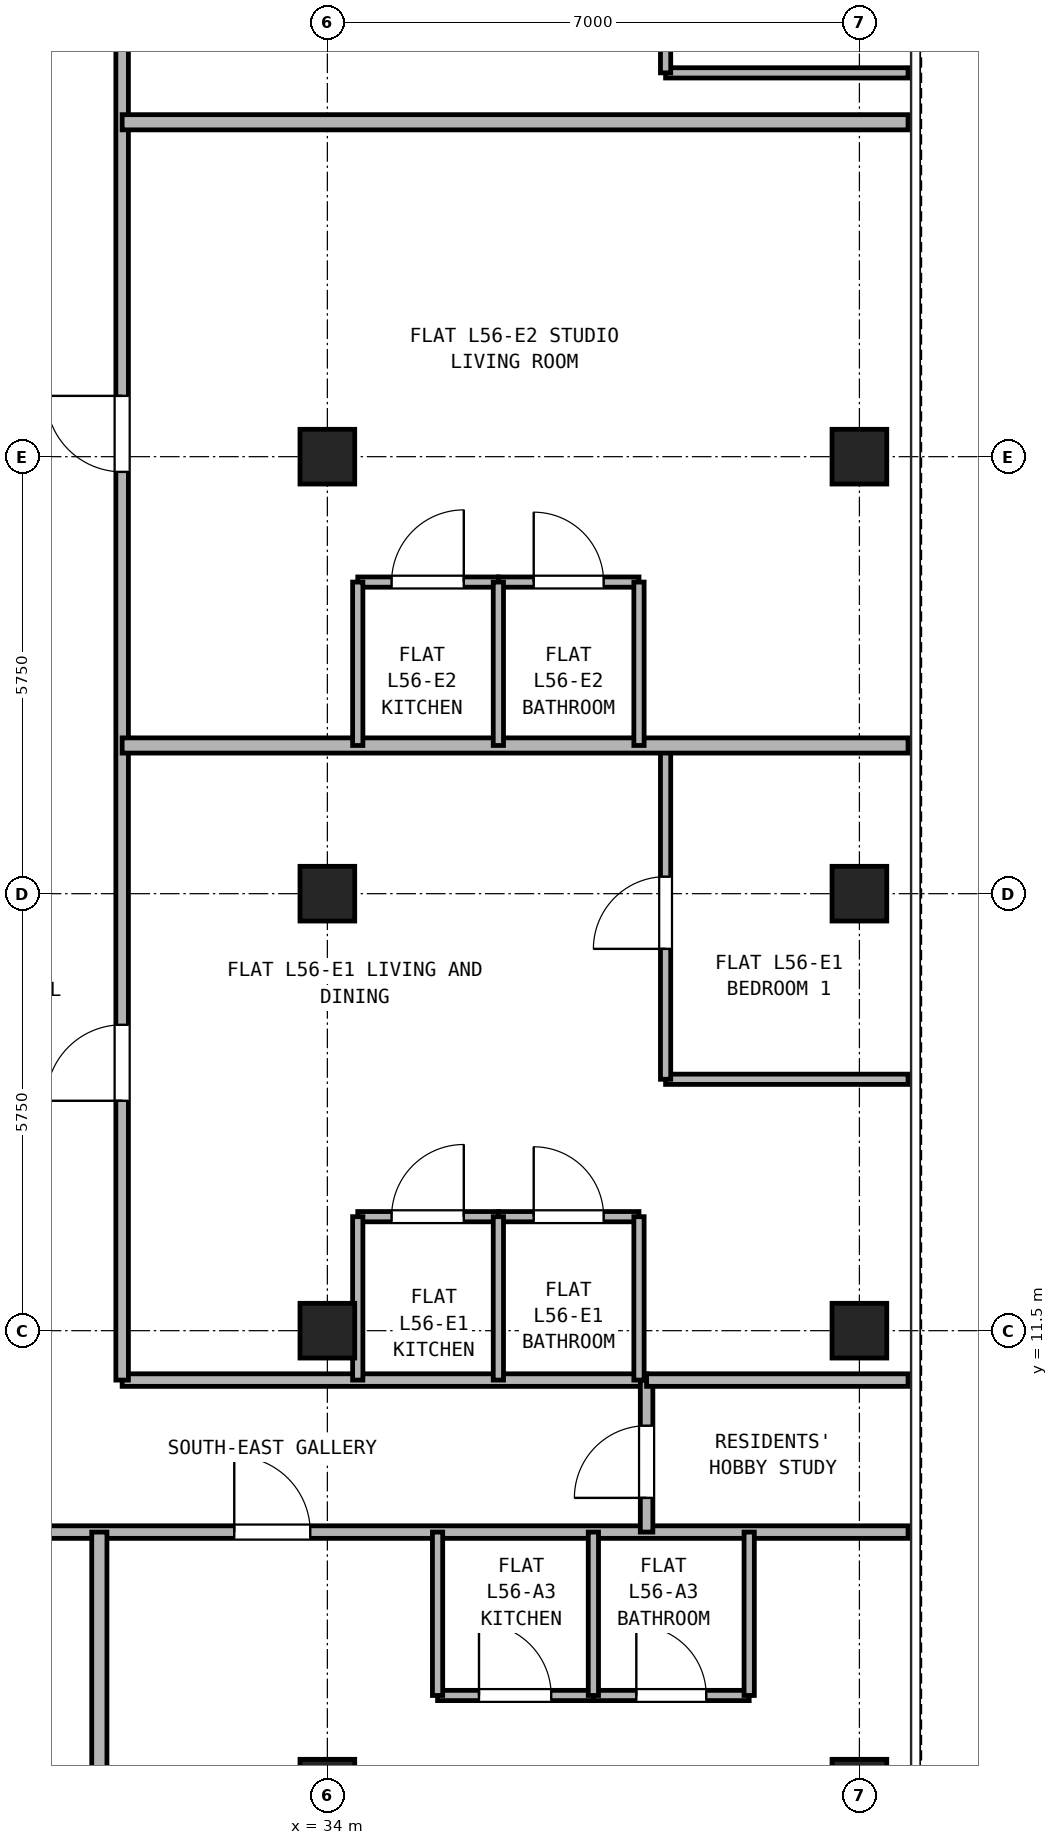
"""IFC4 building model, lengths in metres.
Left out: names, types, materials, properties, quantities, classifications, styles, units other than length and angle.
Written with IfcOpenShell. Run it as: python <this file> out.ifc"""

import sys

from ifc_helpers import new_model, si_unit, direction, frame, frame_2d, origin, origin_2d, place, context, subcontext, project, spatial, rectangle, hollow_rectangle, extrude, source, transform, mapped, element, fill, save


model = new_model("IFC4")
c1 = context("Model", 3, precision=1e-05, world=origin(), true_north=direction((0.0, 1.0)))
c2 = subcontext(c1, "Body", "Model", "MODEL_VIEW")
j1 = project(units=[si_unit("LENGTHUNIT", "METRE"), si_unit("PLANEANGLEUNIT", "RADIAN")], contexts=[c1])
p1 = place(None, origin())
s1 = spatial("IfcSite", under=j1, at=p1, CompositionType="ELEMENT")
p2 = place(p1, origin())
s2 = spatial("IfcBuilding", under=s1, at=p2, CompositionType="ELEMENT")
p3 = place(p2, frame((0.0, 0.0, 199.6)))
s3 = spatial("IfcBuildingStorey", under=s2, at=p3, CompositionType="ELEMENT", Elevation=199.6)
m1 = source(origin(), c2, "Body", "SweptSolid", [
    extrude(hollow_rectangle(XDim=0.72, YDim=0.72, WallThickness=0.04, at=origin_2d()), origin(), (0.0, 0.0, 1.0), 2.95),
])
for number, where, z_axis, x_axis in (
    (1, (41.0, 5.5, 0.0), (0.0, 0.0, 1.0), (1.0, 0.0, 0.0)),
    (2, (41.0, 11.5, 0.0), (0.0, 0.0, 1.0), (1.0, 0.0, 0.0)),
    (3, (41.0, 17.25, 0.0), (0.0, 0.0, 1.0), (1.0, 0.0, 0.0)),
    (4, (41.0, 23.0, 0.0), (0.0, 0.0, 1.0), (1.0, 0.0, 0.0)),
    (5, (34.0, 5.5, 0.0), (0.0, 0.0, 1.0), (1.0, 0.0, 0.0)),
    (6, (34.0, 11.5, 0.0), (0.0, 0.0, 1.0), (1.0, 0.0, 0.0)),
    (7, (34.0, 17.25, 0.0), (0.0, 0.0, 1.0), (1.0, 0.0, 0.0)),
    (8, (34.0, 23.0, 0.0), (0.0, 0.0, 1.0), (1.0, 0.0, 0.0)),
):
    element("IfcColumn", number, at=place(p3, frame(where, z_axis=z_axis, x_axis=x_axis)), inside=s3, PredefinedType="COLUMN", context=c2, shape_type="MappedRepresentation", body=[
        mapped(m1, transform((0.0, 0.0, 0.0), x_axis=(1.0, 0.0, 0.0), y_axis=(0.0, 1.0, 0.0), z_axis=(0.0, 0.0, 1.0), scale=1.0)),
    ])
p4 = place(p3, frame((0.16, 8.85, 0.0), z_axis=(0.0, 0.0, 1.0), x_axis=(1.0, 0.0, 0.0)))
e9 = element("IfcWall", 9, at=p4, inside=s3, PredefinedType="PARTITIONING", context=c2, shape_type="SweptSolid", body=[
    extrude(rectangle(XDim=41.48, YDim=0.165, at=frame_2d((20.74, 0.0))), origin(), (0.0, 0.0, 1.0), 2.95),
])
p5 = place(p4, frame((14.815, 0.0, 0.0)))
e10 = element("IfcOpeningElement", 10, at=p5, cuts=e9, PredefinedType="OPENING", context=c2, shape_type="SweptSolid", body=[
    extrude(rectangle(XDim=1.0, YDim=2.15, at=frame_2d((0.5, 1.075))), frame((0.0, 0.093, 0.0), z_axis=(0.0, -1.0, 0.0), x_axis=(1.0, 0.0, 0.0)), (0.0, 0.0, 1.0), 0.185),
])
p6 = place(p4, frame((28.315, 0.0, 0.0)))
e11 = element("IfcOpeningElement", 11, at=p6, cuts=e9, PredefinedType="OPENING", context=c2, shape_type="SweptSolid", body=[
    extrude(rectangle(XDim=1.0, YDim=2.15, at=frame_2d((0.5, 1.075))), frame((0.0, 0.093, 0.0), z_axis=(0.0, -1.0, 0.0), x_axis=(1.0, 0.0, 0.0)), (0.0, 0.0, 1.0), 0.185),
])
p7 = place(p4, frame((32.615, 0.0, 0.0)))
e12 = element("IfcOpeningElement", 12, at=p7, cuts=e9, PredefinedType="OPENING", context=c2, shape_type="SweptSolid", body=[
    extrude(rectangle(XDim=1.0, YDim=2.15, at=frame_2d((0.5, 1.075))), frame((0.0, 0.093, 0.0), z_axis=(0.0, -1.0, 0.0), x_axis=(1.0, 0.0, 0.0)), (0.0, 0.0, 1.0), 0.185),
])
p8 = place(p3, frame((31.3, 10.85, 0.0), z_axis=(0.0, 0.0, 1.0), x_axis=(1.0, 0.0, 0.0)))
e13 = element("IfcWall", 13, at=p8, inside=s3, PredefinedType="PARTITIONING", context=c2, shape_type="SweptSolid", body=[
    extrude(rectangle(XDim=6.9, YDim=0.165, at=frame_2d((3.45, 0.0))), origin(), (0.0, 0.0, 1.0), 2.95),
])
p9 = place(p3, frame((38.2, 8.85, 0.0), z_axis=(0.0, 0.0, 1.0), x_axis=(0.0, 1.0, 0.0)))
e14 = element("IfcWall", 14, at=p9, inside=s3, PredefinedType="PARTITIONING", context=c2, shape_type="SweptSolid", body=[
    extrude(rectangle(XDim=2.0, YDim=0.165, at=frame_2d((1.0, 0.0))), origin(), (0.0, 0.0, 1.0), 2.95),
])
p10 = place(p9, frame((0.45, 0.0, 0.0)))
e15 = element("IfcOpeningElement", 15, at=p10, cuts=e14, PredefinedType="OPENING", context=c2, shape_type="SweptSolid", body=[
    extrude(rectangle(XDim=0.95, YDim=2.15, at=frame_2d((0.475, 1.075))), frame((0.0, 0.093, 0.0), z_axis=(0.0, -1.0, 0.0), x_axis=(1.0, 0.0, 0.0)), (0.0, 0.0, 1.0), 0.185),
])
p11 = place(p3, frame((31.3, 10.85, 0.0), z_axis=(0.0, 0.0, 1.0), x_axis=(0.0, 1.0, 0.0)))
e16 = element("IfcWall", 16, at=p11, inside=s3, PredefinedType="PARTITIONING", context=c2, shape_type="SweptSolid", body=[
    extrude(rectangle(XDim=24.29, YDim=0.165, at=frame_2d((12.145, 0.0))), origin(), (0.0, 0.0, 1.0), 2.95),
])
p12 = place(p11, frame((3.675, 0.0, 0.0)))
e17 = element("IfcOpeningElement", 17, at=p12, cuts=e16, PredefinedType="OPENING", context=c2, shape_type="SweptSolid", body=[
    extrude(rectangle(XDim=1.0, YDim=2.15, at=frame_2d((0.5, 1.075))), frame((0.0, 0.093, 0.0), z_axis=(0.0, -1.0, 0.0), x_axis=(1.0, 0.0, 0.0)), (0.0, 0.0, 1.0), 0.185),
])
p13 = place(p11, frame((11.95, 0.0, 0.0)))
e18 = element("IfcOpeningElement", 18, at=p13, cuts=e16, PredefinedType="OPENING", context=c2, shape_type="SweptSolid", body=[
    extrude(rectangle(XDim=1.0, YDim=2.15, at=frame_2d((0.5, 1.075))), frame((0.0, 0.093, 0.0), z_axis=(0.0, -1.0, 0.0), x_axis=(1.0, 0.0, 0.0)), (0.0, 0.0, 1.0), 0.185),
])
p14 = place(p11, frame((17.75, 0.0, 0.0)))
e19 = element("IfcOpeningElement", 19, at=p14, cuts=e16, PredefinedType="OPENING", context=c2, shape_type="SweptSolid", body=[
    extrude(rectangle(XDim=1.0, YDim=2.15, at=frame_2d((0.5, 1.075))), frame((0.0, 0.093, 0.0), z_axis=(0.0, -1.0, 0.0), x_axis=(1.0, 0.0, 0.0)), (0.0, 0.0, 1.0), 0.185),
])
p15 = place(p3, frame((31.0, 0.16, 0.0), z_axis=(0.0, 0.0, 1.0), x_axis=(0.0, 1.0, 0.0)))
e20 = element("IfcWall", 20, at=p15, inside=s3, PredefinedType="PARTITIONING", context=c2, shape_type="SweptSolid", body=[
    extrude(rectangle(XDim=8.69, YDim=0.2, at=frame_2d((4.345, 0.0))), origin(), (0.0, 0.0, 1.0), 2.95),
])
p16 = place(p3, frame((35.45, 6.7, 0.0), z_axis=(0.0, 0.0, 1.0), x_axis=(1.0, 0.0, 0.0)))
e21 = element("IfcWall", 21, at=p16, inside=s3, PredefinedType="PARTITIONING", context=c2, shape_type="SweptSolid", body=[
    extrude(rectangle(XDim=2.05, YDim=0.135, at=frame_2d((1.025, 0.0))), origin(), (0.0, 0.0, 1.0), 2.95),
])
p17 = place(p16, frame((0.545, 0.0, 0.0)))
e22 = element("IfcOpeningElement", 22, at=p17, cuts=e21, PredefinedType="OPENING", context=c2, shape_type="SweptSolid", body=[
    extrude(rectangle(XDim=0.95, YDim=2.15, at=frame_2d((0.475, 1.075))), frame((0.0, 0.077, 0.0), z_axis=(0.0, -1.0, 0.0), x_axis=(1.0, 0.0, 0.0)), (0.0, 0.0, 1.0), 0.155),
])
p18 = place(p3, frame((37.5, 6.7, 0.0), z_axis=(0.0, 0.0, 1.0), x_axis=(1.0, 0.0, 0.0)))
e23 = element("IfcWall", 23, at=p18, inside=s3, PredefinedType="PARTITIONING", context=c2, shape_type="SweptSolid", body=[
    extrude(rectangle(XDim=2.05, YDim=0.135, at=frame_2d((1.025, 0.0))), origin(), (0.0, 0.0, 1.0), 2.95),
])
p19 = place(p18, frame((0.565, 0.0, 0.0)))
e24 = element("IfcOpeningElement", 24, at=p19, cuts=e23, PredefinedType="OPENING", context=c2, shape_type="SweptSolid", body=[
    extrude(rectangle(XDim=0.92, YDim=2.1, at=frame_2d((0.46, 1.05))), frame((0.0, 0.077, 0.0), z_axis=(0.0, -1.0, 0.0), x_axis=(1.0, 0.0, 0.0)), (0.0, 0.0, 1.0), 0.155),
])
for number, where, z_axis, x_axis in (
    (25, (35.45, 6.7, 0.0), (0.0, 0.0, 1.0), (0.0, 1.0, 0.0)),
    (26, (37.5, 6.7, 0.0), (0.0, 0.0, 1.0), (0.0, 1.0, 0.0)),
    (27, (39.55, 6.7, 0.0), (0.0, 0.0, 1.0), (0.0, 1.0, 0.0)),
):
    element("IfcWall", number, at=place(p3, frame(where, z_axis=z_axis, x_axis=x_axis)), inside=s3, PredefinedType="PARTITIONING", context=c2, shape_type="SweptSolid", body=[
        extrude(rectangle(XDim=2.15, YDim=0.135, at=frame_2d((1.075, 0.0))), origin(), (0.0, 0.0, 1.0), 2.95),
    ])
p20 = place(p3, frame((38.2, 10.85, 0.0), z_axis=(0.0, 0.0, 1.0), x_axis=(1.0, 0.0, 0.0)))
e28 = element("IfcWall", 28, at=p20, inside=s3, PredefinedType="PARTITIONING", context=c2, shape_type="SweptSolid", body=[
    extrude(rectangle(XDim=3.44, YDim=0.165, at=frame_2d((1.72, 0.0))), origin(), (0.0, 0.0, 1.0), 2.95),
])
p21 = place(p3, frame((34.4, 13.0, 0.0), z_axis=(0.0, 0.0, 1.0), x_axis=(1.0, 0.0, 0.0)))
e29 = element("IfcWall", 29, at=p21, inside=s3, PredefinedType="PARTITIONING", context=c2, shape_type="SweptSolid", body=[
    extrude(rectangle(XDim=1.85, YDim=0.135, at=frame_2d((0.925, 0.0))), origin(), (0.0, 0.0, 1.0), 2.95),
])
p22 = place(p21, frame((0.445, 0.0, 0.0)))
e30 = element("IfcOpeningElement", 30, at=p22, cuts=e29, PredefinedType="OPENING", context=c2, shape_type="SweptSolid", body=[
    extrude(rectangle(XDim=0.95, YDim=2.15, at=frame_2d((0.475, 1.075))), frame((0.0, 0.077, 0.0), z_axis=(0.0, -1.0, 0.0), x_axis=(1.0, 0.0, 0.0)), (0.0, 0.0, 1.0), 0.155),
])
p23 = place(p3, frame((36.25, 13.0, 0.0), z_axis=(0.0, 0.0, 1.0), x_axis=(1.0, 0.0, 0.0)))
e31 = element("IfcWall", 31, at=p23, inside=s3, PredefinedType="PARTITIONING", context=c2, shape_type="SweptSolid", body=[
    extrude(rectangle(XDim=1.85, YDim=0.135, at=frame_2d((0.925, 0.0))), origin(), (0.0, 0.0, 1.0), 2.95),
])
p24 = place(p23, frame((0.465, 0.0, 0.0)))
e32 = element("IfcOpeningElement", 32, at=p24, cuts=e31, PredefinedType="OPENING", context=c2, shape_type="SweptSolid", body=[
    extrude(rectangle(XDim=0.92, YDim=2.1, at=frame_2d((0.46, 1.05))), frame((0.0, 0.077, 0.0), z_axis=(0.0, -1.0, 0.0), x_axis=(1.0, 0.0, 0.0)), (0.0, 0.0, 1.0), 0.155),
])
for number, where, z_axis, x_axis in (
    (33, (34.4, 10.85, 0.0), (0.0, 0.0, 1.0), (0.0, 1.0, 0.0)),
    (34, (36.25, 10.85, 0.0), (0.0, 0.0, 1.0), (0.0, 1.0, 0.0)),
    (35, (38.1, 10.85, 0.0), (0.0, 0.0, 1.0), (0.0, 1.0, 0.0)),
):
    element("IfcWall", number, at=place(p3, frame(where, z_axis=z_axis, x_axis=x_axis)), inside=s3, PredefinedType="PARTITIONING", context=c2, shape_type="SweptSolid", body=[
        extrude(rectangle(XDim=2.15, YDim=0.135, at=frame_2d((1.075, 0.0))), origin(), (0.0, 0.0, 1.0), 2.95),
    ])
p25 = place(p3, frame((38.45, 14.808, 0.0), z_axis=(0.0, 0.0, 1.0), x_axis=(1.0, 0.0, 0.0)))
e36 = element("IfcWall", 36, at=p25, inside=s3, PredefinedType="PARTITIONING", context=c2, shape_type="SweptSolid", body=[
    extrude(rectangle(XDim=3.19, YDim=0.135, at=frame_2d((1.595, 0.0))), origin(), (0.0, 0.0, 1.0), 2.95),
])
p26 = place(p3, frame((38.45, 14.808, 0.0), z_axis=(0.0, 0.0, 1.0), x_axis=(0.0, 1.0, 0.0)))
e37 = element("IfcWall", 37, at=p26, inside=s3, PredefinedType="PARTITIONING", context=c2, shape_type="SweptSolid", body=[
    extrude(rectangle(XDim=4.392, YDim=0.135, at=frame_2d((2.196, 0.0))), origin(), (0.0, 0.0, 1.0), 2.95),
])
p27 = place(p26, frame((1.716, 0.0, 0.0)))
e38 = element("IfcOpeningElement", 38, at=p27, cuts=e37, PredefinedType="OPENING", context=c2, shape_type="SweptSolid", body=[
    extrude(rectangle(XDim=0.95, YDim=2.15, at=frame_2d((0.475, 1.075))), frame((0.0, 0.077, 0.0), z_axis=(0.0, -1.0, 0.0), x_axis=(1.0, 0.0, 0.0)), (0.0, 0.0, 1.0), 0.155),
])
p28 = place(p3, frame((31.3, 19.2, 0.0), z_axis=(0.0, 0.0, 1.0), x_axis=(1.0, 0.0, 0.0)))
e39 = element("IfcWall", 39, at=p28, inside=s3, PredefinedType="PARTITIONING", context=c2, shape_type="SweptSolid", body=[
    extrude(rectangle(XDim=10.34, YDim=0.2, at=frame_2d((5.17, 0.0))), origin(), (0.0, 0.0, 1.0), 2.95),
])
p29 = place(p3, frame((34.4, 21.35, 0.0), z_axis=(0.0, 0.0, 1.0), x_axis=(1.0, 0.0, 0.0)))
e40 = element("IfcWall", 40, at=p29, inside=s3, PredefinedType="PARTITIONING", context=c2, shape_type="SweptSolid", body=[
    extrude(rectangle(XDim=1.85, YDim=0.135, at=frame_2d((0.925, 0.0))), origin(), (0.0, 0.0, 1.0), 2.95),
])
p30 = place(p29, frame((0.445, 0.0, 0.0)))
e41 = element("IfcOpeningElement", 41, at=p30, cuts=e40, PredefinedType="OPENING", context=c2, shape_type="SweptSolid", body=[
    extrude(rectangle(XDim=0.95, YDim=2.15, at=frame_2d((0.475, 1.075))), frame((0.0, 0.077, 0.0), z_axis=(0.0, -1.0, 0.0), x_axis=(1.0, 0.0, 0.0)), (0.0, 0.0, 1.0), 0.155),
])
p31 = place(p3, frame((36.25, 21.35, 0.0), z_axis=(0.0, 0.0, 1.0), x_axis=(1.0, 0.0, 0.0)))
e42 = element("IfcWall", 42, at=p31, inside=s3, PredefinedType="PARTITIONING", context=c2, shape_type="SweptSolid", body=[
    extrude(rectangle(XDim=1.85, YDim=0.135, at=frame_2d((0.925, 0.0))), origin(), (0.0, 0.0, 1.0), 2.95),
])
p32 = place(p31, frame((0.465, 0.0, 0.0)))
e43 = element("IfcOpeningElement", 43, at=p32, cuts=e42, PredefinedType="OPENING", context=c2, shape_type="SweptSolid", body=[
    extrude(rectangle(XDim=0.92, YDim=2.1, at=frame_2d((0.46, 1.05))), frame((0.0, 0.077, 0.0), z_axis=(0.0, -1.0, 0.0), x_axis=(1.0, 0.0, 0.0)), (0.0, 0.0, 1.0), 0.155),
])
for number, where, z_axis, x_axis in (
    (44, (34.4, 19.2, 0.0), (0.0, 0.0, 1.0), (0.0, 1.0, 0.0)),
    (45, (36.25, 19.2, 0.0), (0.0, 0.0, 1.0), (0.0, 1.0, 0.0)),
    (46, (38.1, 19.2, 0.0), (0.0, 0.0, 1.0), (0.0, 1.0, 0.0)),
):
    element("IfcWall", number, at=place(p3, frame(where, z_axis=z_axis, x_axis=x_axis)), inside=s3, PredefinedType="PARTITIONING", context=c2, shape_type="SweptSolid", body=[
        extrude(rectangle(XDim=2.15, YDim=0.135, at=frame_2d((1.075, 0.0))), origin(), (0.0, 0.0, 1.0), 2.95),
    ])
p33 = place(p3, frame((31.3, 27.4, 0.0), z_axis=(0.0, 0.0, 1.0), x_axis=(1.0, 0.0, 0.0)))
e47 = element("IfcWall", 47, at=p33, inside=s3, PredefinedType="PARTITIONING", context=c2, shape_type="SweptSolid", body=[
    extrude(rectangle(XDim=10.34, YDim=0.2, at=frame_2d((5.17, 0.0))), origin(), (0.0, 0.0, 1.0), 2.95),
])
p34 = place(p3, frame((38.45, 28.05, 0.0), z_axis=(0.0, 0.0, 1.0), x_axis=(1.0, 0.0, 0.0)))
e48 = element("IfcWall", 48, at=p34, inside=s3, PredefinedType="PARTITIONING", context=c2, shape_type="SweptSolid", body=[
    extrude(rectangle(XDim=3.19, YDim=0.135, at=frame_2d((1.595, 0.0))), origin(), (0.0, 0.0, 1.0), 2.95),
])
p35 = place(p3, frame((38.45, 28.05, 0.0), z_axis=(0.0, 0.0, 1.0), x_axis=(0.0, 1.0, 0.0)))
e49 = element("IfcWall", 49, at=p35, inside=s3, PredefinedType="PARTITIONING", context=c2, shape_type="SweptSolid", body=[
    extrude(rectangle(XDim=3.4, YDim=0.135, at=frame_2d((1.7, 0.0))), origin(), (0.0, 0.0, 1.0), 2.95),
])
p36 = place(p35, frame((1.22, 0.0, 0.0)))
e50 = element("IfcOpeningElement", 50, at=p36, cuts=e49, PredefinedType="OPENING", context=c2, shape_type="SweptSolid", body=[
    extrude(rectangle(XDim=0.95, YDim=2.15, at=frame_2d((0.475, 1.075))), frame((0.0, 0.077, 0.0), z_axis=(0.0, -1.0, 0.0), x_axis=(1.0, 0.0, 0.0)), (0.0, 0.0, 1.0), 0.155),
])
p37 = place(p17, origin())
e51 = element("IfcDoor", 51, at=p37, inside=s3, OperationType="SINGLE_SWING_LEFT", PredefinedType="DOOR", context=c2, shape_type="SweptSolid", body=[
    extrude(rectangle(XDim=0.95, YDim=2.15, at=frame_2d((0.475, 1.075))), frame((0.0, 0.025, 0.0), z_axis=(0.0, -1.0, 0.0), x_axis=(1.0, 0.0, 0.0)), (0.0, 0.0, 1.0), 0.05),
])
fill(e22, e51)
p38 = place(p19, origin())
e52 = element("IfcDoor", 52, at=p38, inside=s3, OperationType="SINGLE_SWING_LEFT", PredefinedType="DOOR", context=c2, shape_type="SweptSolid", body=[
    extrude(rectangle(XDim=0.92, YDim=2.1, at=frame_2d((0.46, 1.05))), frame((0.0, 0.025, 0.0), z_axis=(0.0, -1.0, 0.0), x_axis=(1.0, 0.0, 0.0)), (0.0, 0.0, 1.0), 0.05),
])
fill(e24, e52)
p39 = place(p7, frame((1.0, 0.0, 0.0), z_axis=(0.0, 0.0, 1.0), x_axis=(-1.0, 0.0, 0.0)))
e53 = element("IfcDoor", 53, at=p39, inside=s3, OperationType="SINGLE_SWING_LEFT", PredefinedType="DOOR", context=c2, shape_type="SweptSolid", body=[
    extrude(rectangle(XDim=1.0, YDim=2.15, at=frame_2d((0.5, 1.075))), frame((0.0, 0.025, 0.0), z_axis=(0.0, -1.0, 0.0), x_axis=(1.0, 0.0, 0.0)), (0.0, 0.0, 1.0), 0.05),
])
fill(e12, e53)
p40 = place(p10, origin())
e54 = element("IfcDoor", 54, at=p40, inside=s3, OperationType="SINGLE_SWING_LEFT", PredefinedType="DOOR", context=c2, shape_type="SweptSolid", body=[
    extrude(rectangle(XDim=0.95, YDim=2.15, at=frame_2d((0.475, 1.075))), frame((0.0, 0.025, 0.0), z_axis=(0.0, -1.0, 0.0), x_axis=(1.0, 0.0, 0.0)), (0.0, 0.0, 1.0), 0.05),
])
fill(e15, e54)
p41 = place(p22, origin())
e55 = element("IfcDoor", 55, at=p41, inside=s3, OperationType="SINGLE_SWING_RIGHT", PredefinedType="DOOR", context=c2, shape_type="SweptSolid", body=[
    extrude(rectangle(XDim=0.95, YDim=2.15, at=frame_2d((0.475, 1.075))), frame((0.0, 0.025, 0.0), z_axis=(0.0, -1.0, 0.0), x_axis=(1.0, 0.0, 0.0)), (0.0, 0.0, 1.0), 0.05),
])
fill(e30, e55)
p42 = place(p24, origin())
e56 = element("IfcDoor", 56, at=p42, inside=s3, OperationType="SINGLE_SWING_LEFT", PredefinedType="DOOR", context=c2, shape_type="SweptSolid", body=[
    extrude(rectangle(XDim=0.92, YDim=2.1, at=frame_2d((0.46, 1.05))), frame((0.0, 0.025, 0.0), z_axis=(0.0, -1.0, 0.0), x_axis=(1.0, 0.0, 0.0)), (0.0, 0.0, 1.0), 0.05),
])
fill(e32, e56)
p43 = place(p27, frame((0.95, 0.0, 0.0), z_axis=(0.0, 0.0, 1.0), x_axis=(-1.0, 0.0, 0.0)))
e57 = element("IfcDoor", 57, at=p43, inside=s3, OperationType="SINGLE_SWING_LEFT", PredefinedType="DOOR", context=c2, shape_type="SweptSolid", body=[
    extrude(rectangle(XDim=0.95, YDim=2.15, at=frame_2d((0.475, 1.075))), frame((0.0, 0.025, 0.0), z_axis=(0.0, -1.0, 0.0), x_axis=(1.0, 0.0, 0.0)), (0.0, 0.0, 1.0), 0.05),
])
fill(e38, e57)
p44 = place(p12, frame((1.0, 0.0, 0.0), z_axis=(0.0, 0.0, 1.0), x_axis=(-1.0, 0.0, 0.0)))
e58 = element("IfcDoor", 58, at=p44, inside=s3, OperationType="SINGLE_SWING_LEFT", PredefinedType="DOOR", context=c2, shape_type="SweptSolid", body=[
    extrude(rectangle(XDim=1.0, YDim=2.15, at=frame_2d((0.5, 1.075))), frame((0.0, 0.025, 0.0), z_axis=(0.0, -1.0, 0.0), x_axis=(1.0, 0.0, 0.0)), (0.0, 0.0, 1.0), 0.05),
])
fill(e17, e58)
p45 = place(p30, origin())
e59 = element("IfcDoor", 59, at=p45, inside=s3, OperationType="SINGLE_SWING_RIGHT", PredefinedType="DOOR", context=c2, shape_type="SweptSolid", body=[
    extrude(rectangle(XDim=0.95, YDim=2.15, at=frame_2d((0.475, 1.075))), frame((0.0, 0.025, 0.0), z_axis=(0.0, -1.0, 0.0), x_axis=(1.0, 0.0, 0.0)), (0.0, 0.0, 1.0), 0.05),
])
fill(e41, e59)
p46 = place(p32, origin())
e60 = element("IfcDoor", 60, at=p46, inside=s3, OperationType="SINGLE_SWING_LEFT", PredefinedType="DOOR", context=c2, shape_type="SweptSolid", body=[
    extrude(rectangle(XDim=0.92, YDim=2.1, at=frame_2d((0.46, 1.05))), frame((0.0, 0.025, 0.0), z_axis=(0.0, -1.0, 0.0), x_axis=(1.0, 0.0, 0.0)), (0.0, 0.0, 1.0), 0.05),
])
fill(e43, e60)
p47 = place(p13, frame((1.0, 0.0, 0.0), z_axis=(0.0, 0.0, 1.0), x_axis=(-1.0, 0.0, 0.0)))
e61 = element("IfcDoor", 61, at=p47, inside=s3, OperationType="SINGLE_SWING_RIGHT", PredefinedType="DOOR", context=c2, shape_type="SweptSolid", body=[
    extrude(rectangle(XDim=1.0, YDim=2.15, at=frame_2d((0.5, 1.075))), frame((0.0, 0.025, 0.0), z_axis=(0.0, -1.0, 0.0), x_axis=(1.0, 0.0, 0.0)), (0.0, 0.0, 1.0), 0.05),
])
fill(e18, e61)
save(model, sys.argv[1])
